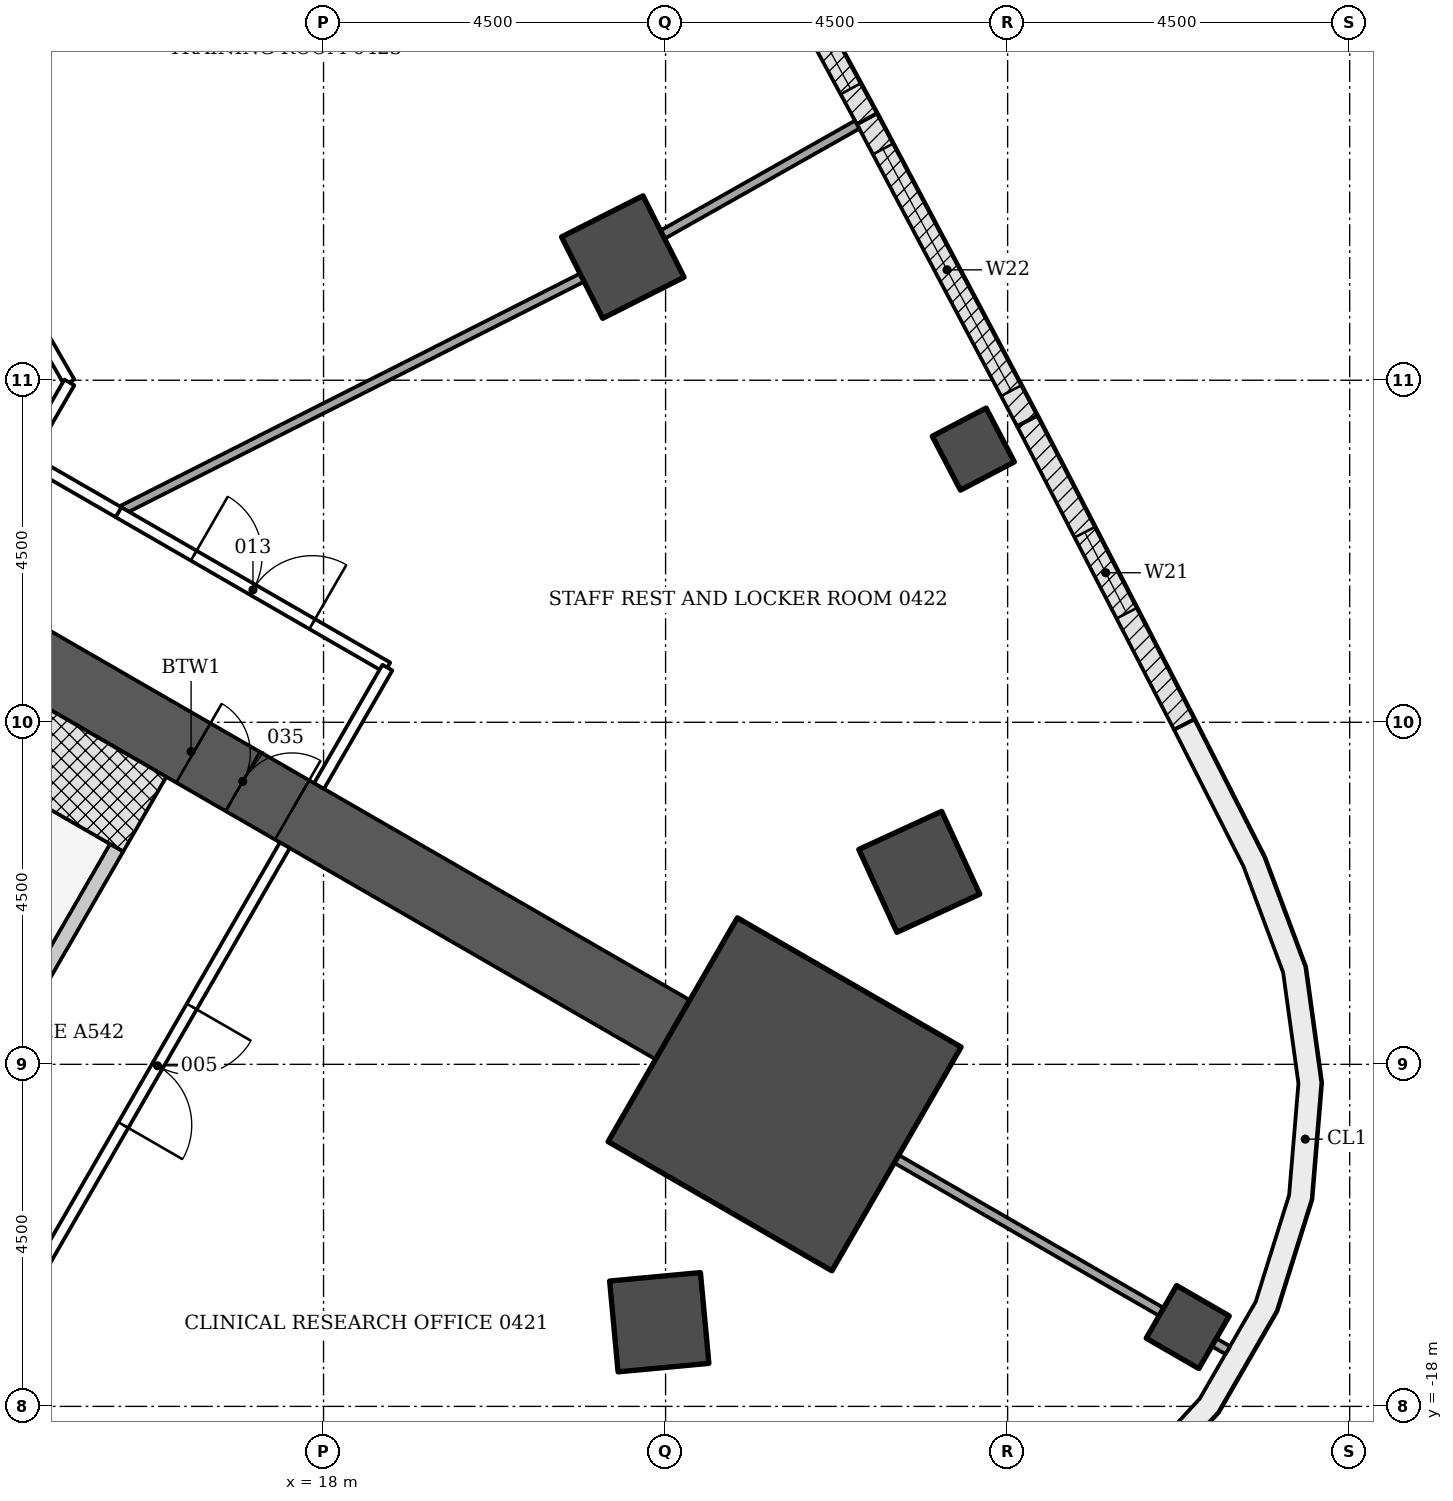
"""IFC4 building model, lengths in metres.
Left out: names, types, materials, properties, quantities, classifications, styles, units other than length and angle.
Written with IfcOpenShell. Run it as: python <this file> out.ifc"""

import sys

from ifc_helpers import new_model, si_unit, direction, frame, frame_2d, origin, origin_2d, place, context, subcontext, project, spatial, polyline, rectangle, outline, extrude, element, fill, save


model = new_model("IFC4")
c1 = context("Model", 3, precision=1e-05, world=origin(), true_north=direction((0.0, 1.0)))
c2 = subcontext(c1, "Body", "Model", "MODEL_VIEW")
j1 = project(units=[si_unit("LENGTHUNIT", "METRE"), si_unit("PLANEANGLEUNIT", "RADIAN")], contexts=[c1])
p1 = place(None, origin())
s1 = spatial("IfcSite", under=j1, at=p1, CompositionType="ELEMENT")
p2 = place(p1, origin())
s2 = spatial("IfcBuilding", under=s1, at=p2, CompositionType="ELEMENT")
p3 = place(p2, frame((0.0, 0.0, 19.5)))
s3 = spatial("IfcBuildingStorey", under=s2, at=p3, CompositionType="ELEMENT", Elevation=19.5)
for number, where, z_axis, x_axis in (
    (1, (22.417, -16.893, -0.25), (0.0, 0.0, 1.0), (0.093, -0.996, 0.0)),
    (2, (25.838, -10.967, -0.25), (0.0, 0.0, 1.0), (0.909, 0.418, 0.0)),
    (3, (21.937, -2.88, -0.25), (0.0, 0.0, 1.0), (0.893, 0.451, 0.0)),
):
    element("IfcColumn", number, at=place(p3, frame(where, z_axis=z_axis, x_axis=x_axis)), inside=s3, PredefinedType="COLUMN", context=c2, shape_type="SweptSolid", body=[
        extrude(rectangle(XDim=1.2, YDim=1.2, at=origin_2d()), origin(), (0.0, 0.0, 1.0), 4.55),
    ])
for number, where, z_axis, x_axis in (
    (4, (29.37, -16.957, -0.25), (0.0, 0.0, 1.0), (0.866, -0.5, 0.0)),
    (5, (26.548, -5.406, -0.25), (0.0, 0.0, 1.0), (0.886, 0.464, 0.0)),
):
    element("IfcColumn", number, at=place(p3, frame(where, z_axis=z_axis, x_axis=x_axis)), inside=s3, PredefinedType="COLUMN", context=c2, shape_type="SweptSolid", body=[
        extrude(rectangle(XDim=0.8, YDim=0.8, at=origin_2d()), origin(), (0.0, 0.0, 1.0), 4.55),
    ])
p4 = place(p3, frame((9.922, -5.728, -0.25), z_axis=(0.0, 0.0, 1.0), x_axis=(0.866028046028, -0.499995423472, 0.0)))
e6 = element("IfcWall", 6, at=p4, inside=s3, PredefinedType="SHEAR", context=c2, shape_type="SweptSolid", body=[
    extrude(rectangle(XDim=14.633, YDim=0.9, at=frame_2d((7.316, 0.0))), origin(), (0.0, 0.0, 1.0), 4.55),
])
p5 = place(p4, frame((7.35, 0.0, 0.25)))
e7 = element("IfcOpeningElement", 7, at=p5, cuts=e6, PredefinedType="OPENING", context=c2, shape_type="SweptSolid", body=[
    extrude(rectangle(XDim=1.5, YDim=2.1, at=frame_2d((0.75, 1.05))), frame((0.0, 0.46, 0.0), z_axis=(0.0, -1.0, 0.0), x_axis=(1.0, 0.0, 0.0)), (0.0, 0.0, 1.0), 0.92),
])
p6 = place(p3, frame((24.066, -13.895, -0.25), z_axis=(0.0, 0.0, 1.0), x_axis=(0.866025403784, -0.5, 0.0)))
e8 = element("IfcColumn", 8, at=p6, inside=s3, PredefinedType="COLUMN", context=c2, shape_type="SweptSolid", body=[
    extrude(rectangle(XDim=3.4, YDim=3.4, at=origin_2d()), origin(), (0.0, 0.0, 1.0), 4.55),
])
p7 = place(p3, frame((27.258, -5.036, 0.0), z_axis=(0.0, 0.0, 1.0), x_axis=(0.459443600121, -0.888206945654, 0.0)))
e9 = element("IfcWall", 9, at=p7, inside=s3, PredefinedType="NOTDEFINED", context=c2, shape_type="SweptSolid", body=[
    extrude(rectangle(XDim=4.496, YDim=0.3, at=frame_2d((2.248, 0.0))), origin(), (0.0, 0.0, 1.0), 4.3),
])
p8 = place(p7, frame((1.648, 0.0, 0.8)))
e10 = element("IfcOpeningElement", 10, at=p8, cuts=e9, PredefinedType="OPENING", context=c2, shape_type="SweptSolid", body=[
    extrude(rectangle(XDim=1.2, YDim=3.0, at=frame_2d((0.6, 1.5))), frame((0.0, 0.16, 0.0), z_axis=(0.0, -1.0, 0.0), x_axis=(1.0, 0.0, 0.0)), (0.0, 0.0, 1.0), 0.32),
])
p9 = place(p3, frame((25.15, -1.062, 0.0), z_axis=(0.0, 0.0, 1.0), x_axis=(0.468566202388, -0.883428386447, 0.0)))
e11 = element("IfcWall", 11, at=p9, inside=s3, PredefinedType="NOTDEFINED", context=c2, shape_type="SweptSolid", body=[
    extrude(rectangle(XDim=4.496, YDim=0.3, at=frame_2d((2.248, 0.0))), origin(), (0.0, 0.0, 1.0), 4.3),
])
p10 = place(p9, frame((0.448, 0.0, 1.5)))
e12 = element("IfcOpeningElement", 12, at=p10, cuts=e11, PredefinedType="OPENING", context=c2, shape_type="SweptSolid", body=[
    extrude(rectangle(XDim=3.6, YDim=1.8, at=frame_2d((1.8, 0.9))), frame((0.0, 0.16, 0.0), z_axis=(0.0, -1.0, 0.0), x_axis=(1.0, 0.0, 0.0)), (0.0, 0.0, 1.0), 0.32),
])
p11 = place(p3, frame((23.001, 2.89, 0.0), z_axis=(0.0, 0.0, 1.0), x_axis=(0.477577109439, -0.878589838628, 0.0)))
e13 = element("IfcWall", 13, at=p11, inside=s3, PredefinedType="NOTDEFINED", context=c2, shape_type="SweptSolid", body=[
    extrude(rectangle(XDim=4.496, YDim=0.3, at=frame_2d((2.248, 0.0))), origin(), (0.0, 0.0, 1.0), 4.3),
])
p12 = place(p11, frame((0.448, 0.0, 1.5)))
e14 = element("IfcOpeningElement", 14, at=p12, cuts=e13, PredefinedType="OPENING", context=c2, shape_type="SweptSolid", body=[
    extrude(rectangle(XDim=3.6, YDim=1.8, at=frame_2d((1.8, 0.9))), frame((0.0, 0.16, 0.0), z_axis=(0.0, -1.0, 0.0), x_axis=(1.0, 0.0, 0.0)), (0.0, 0.0, 1.0), 0.32),
])
p13 = place(p3, origin())
e15 = element("IfcWall", 15, at=p13, inside=s3, PredefinedType="NOTDEFINED", context=c2, shape_type="SweptSolid", body=[
    extrude(outline(polyline([(22.49, -21.03), (24.522, -20.921), (26.04, -20.666), (27.465, -20.086), (28.729, -19.209), (29.771, -18.077), (30.54, -16.744), (31.0, -15.276), (31.128, -13.742), (30.917, -12.218), (30.379, -10.776), (29.457, -8.962), (29.19, -9.098), (30.104, -10.897), (30.625, -12.292), (30.826, -13.75), (30.704, -15.218), (30.264, -16.623), (29.528, -17.898), (28.531, -18.981), (27.321, -19.821), (25.957, -20.376), (24.489, -20.622), (22.474, -20.73), (22.49, -21.03)])), origin(), (0.0, 0.0, 1.0), 4.3),
])
p14 = place(p3, frame((9.413, -6.61, -0.25), z_axis=(0.0, 0.0, 1.0), x_axis=(0.866018442252, -0.500012057535, 0.0)))
e16 = element("IfcWall", 16, at=p14, inside=s3, PredefinedType="SHEAR", context=c2, shape_type="SweptSolid", body=[
    extrude(rectangle(XDim=7.2, YDim=1.136, at=frame_2d((3.6, 0.0))), origin(), (0.0, 0.0, 1.0), 4.55),
])
p15 = place(p3, frame((0.0, 0.0, -0.25)))
e17 = element("IfcWall", 17, at=p15, inside=s3, PredefinedType="SHEAR", context=c2, shape_type="SweptSolid", body=[
    extrude(outline(polyline([(12.104, -13.149), (14.289, -12.563), (15.364, -10.701), (15.191, -10.601), (14.157, -12.392), (12.132, -12.934), (12.204, -12.976), (12.204, -12.976), (12.204, -12.976), (12.204, -12.976), (12.204, -12.976), (12.204, -12.976), (12.204, -12.976), (12.204, -12.976), (12.204, -12.976), (12.204, -12.976), (12.204, -12.976), (12.204, -12.976), (12.204, -12.976), (12.204, -12.976), (12.204, -12.976), (12.204, -12.976), (12.204, -12.976), (12.104, -13.149)])), origin(), (0.0, 0.0, 1.0), 4.55),
])
p16 = place(p3, frame((17.491, -10.618, 0.0), z_axis=(0.0, 0.0, 1.0), x_axis=(-0.499969057507, -0.866043267704, 0.0)))
e18 = element("IfcWall", 18, at=p16, inside=s3, PredefinedType="PARTITIONING", context=c2, shape_type="SweptSolid", body=[
    extrude(rectangle(XDim=6.685, YDim=0.15, at=frame_2d((3.342, 0.0))), origin(), (0.0, 0.0, 1.0), 3.843),
])
p17 = place(p16, frame((2.45, 0.0, 0.0)))
e19 = element("IfcOpeningElement", 19, at=p17, cuts=e18, PredefinedType="OPENING", context=c2, shape_type="SweptSolid", body=[
    extrude(rectangle(XDim=1.8, YDim=2.1, at=frame_2d((0.9, 1.05))), frame((0.0, 0.085, 0.0), z_axis=(0.0, -1.0, 0.0), x_axis=(1.0, 0.0, 0.0)), (0.0, 0.0, 1.0), 0.17),
])
p18 = place(p3, frame((29.023, -16.757, 0.0), z_axis=(0.0, 0.0, 1.0), x_axis=(-0.866027971625, 0.499995552344, 0.0)))
e20 = element("IfcWall", 20, at=p18, inside=s3, PredefinedType="PARTITIONING", context=c2, shape_type="SweptSolid", body=[
    extrude(rectangle(XDim=4.024, YDim=0.12, at=frame_2d((2.012, 0.0))), origin(), (0.0, 0.0, 1.0), 3.767),
])
p19 = place(p3, frame((29.896, -17.261, 0.0), z_axis=(0.0, 0.0, 1.0), x_axis=(-0.865774595023, 0.500434162116, 0.0)))
e21 = element("IfcWall", 21, at=p19, inside=s3, PredefinedType="PARTITIONING", context=c2, shape_type="SweptSolid", body=[
    extrude(rectangle(XDim=0.208, YDim=0.12, at=frame_2d((0.104, 0.0))), origin(), (0.0, 0.0, 1.0), 4.3),
])
p20 = place(p3, frame((21.401, -3.15, 0.0), z_axis=(0.0, 0.0, 1.0), x_axis=(-0.892483368892, -0.451080299117, 0.0)))
e22 = element("IfcWall", 22, at=p20, inside=s3, PredefinedType="PARTITIONING", context=c2, shape_type="SweptSolid", body=[
    extrude(rectangle(XDim=6.837, YDim=0.12, at=frame_2d((3.418, 0.0))), origin(), (0.0, 0.0, 1.0), 3.767),
])
p21 = place(p3, frame((25.02, -1.138, 0.0), z_axis=(0.0, 0.0, 1.0), x_axis=(-0.870620069476, -0.491955988505, 0.0)))
e23 = element("IfcWall", 23, at=p21, inside=s3, PredefinedType="PARTITIONING", context=c2, shape_type="SweptSolid", body=[
    extrude(rectangle(XDim=2.939, YDim=0.12, at=frame_2d((1.47, 0.0))), origin(), (0.0, 0.0, 1.0), 3.683),
])
p22 = place(p3, frame((15.296, -6.233, 0.0), z_axis=(0.0, 0.0, 1.0), x_axis=(0.866035577775, -0.499982377718, 0.0)))
e24 = element("IfcWall", 24, at=p22, inside=s3, PredefinedType="PARTITIONING", context=c2, shape_type="SweptSolid", body=[
    extrude(rectangle(XDim=4.093, YDim=0.15, at=frame_2d((2.046, 0.0))), origin(), (0.0, 0.0, 1.0), 3.767),
])
p23 = place(p22, frame((1.15, 0.0, 0.0)))
e25 = element("IfcOpeningElement", 25, at=p23, cuts=e24, PredefinedType="OPENING", context=c2, shape_type="SweptSolid", body=[
    extrude(rectangle(XDim=1.8, YDim=2.1, at=frame_2d((0.9, 1.05))), frame((0.0, 0.085, 0.0), z_axis=(0.0, -1.0, 0.0), x_axis=(1.0, 0.0, 0.0)), (0.0, 0.0, 1.0), 0.17),
])
p24 = place(p3, frame((18.84, -8.281, 0.0), z_axis=(0.0, 0.0, 1.0), x_axis=(-0.500126010714, -0.86595263924, 0.0)))
e26 = element("IfcWall", 26, at=p24, inside=s3, PredefinedType="PARTITIONING", context=c2, shape_type="SweptSolid", body=[
    extrude(rectangle(XDim=1.798, YDim=0.15, at=frame_2d((0.899, 0.0))), origin(), (0.0, 0.0, 1.0), 3.843),
])
p25 = place(p3, frame((11.205, 1.45, 0.0), z_axis=(0.0, 0.0, 1.0), x_axis=(0.500008243208, -0.866020644514, 0.0)))
e27 = element("IfcWall", 27, at=p25, inside=s3, PredefinedType="PARTITIONING", context=c2, shape_type="SweptSolid", body=[
    extrude(rectangle(XDim=6.902, YDim=0.15, at=frame_2d((3.451, 0.0))), origin(), (0.0, 0.0, 1.0), 3.698),
])
p26 = place(p25, frame((2.55, 0.0, 0.0)))
e28 = element("IfcOpeningElement", 28, at=p26, cuts=e27, PredefinedType="OPENING", context=c2, shape_type="SweptSolid", body=[
    extrude(rectangle(XDim=1.8, YDim=2.1, at=frame_2d((0.9, 1.05))), frame((0.0, 0.085, 0.0), z_axis=(0.0, -1.0, 0.0), x_axis=(1.0, 0.0, 0.0)), (0.0, 0.0, 1.0), 0.17),
])
p27 = place(p3, frame((14.656, -4.529, 0.0), z_axis=(0.0, 0.0, 1.0), x_axis=(-0.500502949238, -0.865734831114, 0.0)))
e29 = element("IfcWall", 29, at=p27, inside=s3, PredefinedType="PARTITIONING", context=c2, shape_type="SweptSolid", body=[
    extrude(rectangle(XDim=1.155, YDim=0.15, at=frame_2d((0.578, 0.0))), origin(), (0.0, 0.0, 1.0), 4.3),
])
p28 = place(p3, frame((14.078, -5.529, 0.0), z_axis=(0.0, 0.0, 1.0), x_axis=(0.866110865696, -0.499851946404, 0.0)))
e30 = element("IfcWall", 30, at=p28, inside=s3, PredefinedType="PARTITIONING", context=c2, shape_type="SweptSolid", body=[
    extrude(rectangle(XDim=1.415, YDim=0.15, at=frame_2d((0.707, 0.0))), origin(), (0.0, 0.0, 1.0), 3.767),
])
p29 = place(p8, origin())
e31 = element("IfcWindow", 31, at=p29, inside=s3, PartitioningType="SINGLE_PANEL", PredefinedType="WINDOW", context=c2, shape_type="SweptSolid", body=[
    extrude(rectangle(XDim=1.2, YDim=3.0, at=frame_2d((0.6, 1.5))), frame((0.0, 0.03, 0.0), z_axis=(0.0, -1.0, 0.0), x_axis=(1.0, 0.0, 0.0)), (0.0, 0.0, 1.0), 0.06),
])
fill(e10, e31)
p30 = place(p10, origin())
e32 = element("IfcWindow", 32, at=p30, inside=s3, PartitioningType="SINGLE_PANEL", PredefinedType="WINDOW", context=c2, shape_type="SweptSolid", body=[
    extrude(rectangle(XDim=3.6, YDim=1.8, at=frame_2d((1.8, 0.9))), frame((0.0, 0.03, 0.0), z_axis=(0.0, -1.0, 0.0), x_axis=(1.0, 0.0, 0.0)), (0.0, 0.0, 1.0), 0.06),
])
fill(e12, e32)
p31 = place(p12, origin())
e33 = element("IfcWindow", 33, at=p31, inside=s3, PartitioningType="SINGLE_PANEL", PredefinedType="WINDOW", context=c2, shape_type="SweptSolid", body=[
    extrude(rectangle(XDim=3.6, YDim=1.8, at=frame_2d((1.8, 0.9))), frame((0.0, 0.03, 0.0), z_axis=(0.0, -1.0, 0.0), x_axis=(1.0, 0.0, 0.0)), (0.0, 0.0, 1.0), 0.06),
])
fill(e14, e33)
p32 = place(p17, origin())
e34 = element("IfcDoor", 34, at=p32, inside=s3, OperationType="DOUBLE_DOOR_SINGLE_SWING", PredefinedType="DOOR", context=c2, shape_type="SweptSolid", body=[
    extrude(rectangle(XDim=1.8, YDim=2.1, at=frame_2d((0.9, 1.05))), frame((0.0, 0.025, 0.0), z_axis=(0.0, -1.0, 0.0), x_axis=(1.0, 0.0, 0.0)), (0.0, 0.0, 1.0), 0.05),
])
fill(e19, e34)
p33 = place(p23, origin())
e35 = element("IfcDoor", 35, at=p33, inside=s3, OperationType="DOUBLE_DOOR_SINGLE_SWING", PredefinedType="DOOR", context=c2, shape_type="SweptSolid", body=[
    extrude(rectangle(XDim=1.8, YDim=2.1, at=frame_2d((0.9, 1.05))), frame((0.0, 0.025, 0.0), z_axis=(0.0, -1.0, 0.0), x_axis=(1.0, 0.0, 0.0)), (0.0, 0.0, 1.0), 0.05),
])
fill(e25, e35)
p34 = place(p5, origin())
e36 = element("IfcDoor", 36, at=p34, inside=s3, OperationType="DOUBLE_DOOR_SINGLE_SWING", PredefinedType="DOOR", context=c2, shape_type="SweptSolid", body=[
    extrude(rectangle(XDim=1.5, YDim=2.1, at=frame_2d((0.75, 1.05))), frame((0.0, 0.025, 0.0), z_axis=(0.0, -1.0, 0.0), x_axis=(1.0, 0.0, 0.0)), (0.0, 0.0, 1.0), 0.05),
])
fill(e7, e36)
save(model, sys.argv[1])
